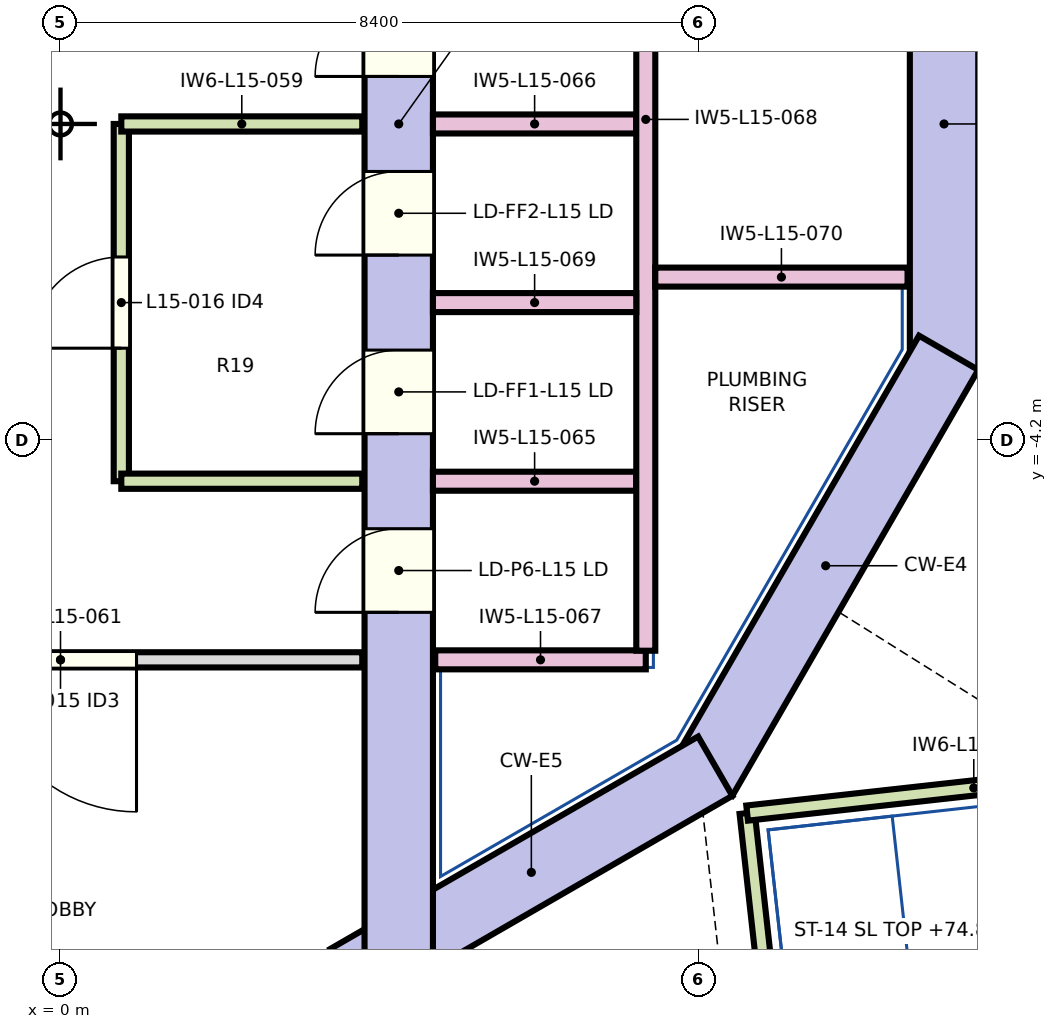
"""IFC4 building model, lengths in metres.
Left out: names, types, materials, properties, quantities, classifications, styles, units other than length and angle.
Written with IfcOpenShell. Run it as: python <this file> out.ifc"""

import sys

from ifc_helpers import new_model, si_unit, direction, frame, frame_2d, origin, place, context, subcontext, project, spatial, rectangle, extrude, element, fill, save


model = new_model("IFC4")
c1 = context("Model", 3, precision=1e-05, world=origin(), true_north=direction((0.0, 1.0)))
c2 = subcontext(c1, "Body", "Model", "MODEL_VIEW")
j1 = project(units=[si_unit("LENGTHUNIT", "METRE"), si_unit("PLANEANGLEUNIT", "RADIAN")], contexts=[c1])
p1 = place(None, origin())
s1 = spatial("IfcSite", under=j1, at=p1, CompositionType="ELEMENT")
p2 = place(p1, origin())
s2 = spatial("IfcBuilding", under=s1, at=p2, CompositionType="ELEMENT")
p3 = place(p2, frame((0.0, 0.0, 72.9)))
s3 = spatial("IfcBuildingStorey", under=s2, at=p3, CompositionType="ELEMENT", Elevation=72.9)
p4 = place(p3, frame((11.624, 3.235, 0.0), z_axis=(0.0, 0.0, 1.0), x_axis=(0.0, -1.0, 0.0)))
e1 = element("IfcWall", 1, at=p4, inside=s3, PredefinedType="SHEAR", context=c2, shape_type="SweptSolid", body=[
    extrude(rectangle(XDim=6.471, YDim=0.9, at=frame_2d((3.235, 0.0))), origin(), (0.0, 0.0, 1.0), 3.8),
])
p5 = place(p3, frame((11.684, -3.01, 0.0), z_axis=(0.0, 0.0, 1.0), x_axis=(-0.499990282633, -0.866031014036, 0.0)))
e2 = element("IfcWall", 2, at=p5, inside=s3, PredefinedType="SHEAR", context=c2, shape_type="SweptSolid", body=[
    extrude(rectangle(XDim=6.47, YDim=0.9, at=frame_2d((3.235, 0.0))), origin(), (0.0, 0.0, 1.0), 3.8),
])
p6 = place(p3, frame((8.614, -8.449, 0.0), z_axis=(0.0, 0.0, 1.0), x_axis=(-0.866026961591, -0.49999730179, 0.0)))
e3 = element("IfcWall", 3, at=p6, inside=s3, PredefinedType="SHEAR", context=c2, shape_type="SweptSolid", body=[
    extrude(rectangle(XDim=5.587, YDim=0.9, at=frame_2d((2.794, 0.0))), origin(), (0.0, 0.0, 1.0), 3.8),
])
p7 = place(p3, frame((4.45, -11.633, 0.0), z_axis=(0.0, 0.0, 1.0), x_axis=(0.0, 1.0, 0.0)))
e4 = element("IfcWall", 4, at=p7, inside=s3, PredefinedType="SHEAR", context=c2, shape_type="SweptSolid", body=[
    extrude(rectangle(XDim=23.265, YDim=0.9, at=frame_2d((11.633, 0.0))), origin(), (0.0, 0.0, 1.0), 3.8),
])
p8 = place(p7, frame((7.558, 0.0, 0.0)))
e5 = element("IfcOpeningElement", 5, at=p8, cuts=e4, PredefinedType="OPENING", context=c2, shape_type="SweptSolid", body=[
    extrude(rectangle(XDim=1.1, YDim=2.1, at=frame_2d((0.55, 1.05))), frame((0.0, 0.46, 0.0), z_axis=(0.0, -1.0, 0.0), x_axis=(1.0, 0.0, 0.0)), (0.0, 0.0, 1.0), 0.92),
])
p9 = place(p7, frame((9.907, 0.0, 0.0)))
e6 = element("IfcOpeningElement", 6, at=p9, cuts=e4, PredefinedType="OPENING", context=c2, shape_type="SweptSolid", body=[
    extrude(rectangle(XDim=1.1, YDim=2.1, at=frame_2d((0.55, 1.05))), frame((0.0, 0.46, 0.0), z_axis=(0.0, -1.0, 0.0), x_axis=(1.0, 0.0, 0.0)), (0.0, 0.0, 1.0), 0.92),
])
p10 = place(p7, frame((12.258, 0.0, 0.0)))
e7 = element("IfcOpeningElement", 7, at=p10, cuts=e4, PredefinedType="OPENING", context=c2, shape_type="SweptSolid", body=[
    extrude(rectangle(XDim=1.1, YDim=2.1, at=frame_2d((0.55, 1.05))), frame((0.0, 0.46, 0.0), z_axis=(0.0, -1.0, 0.0), x_axis=(1.0, 0.0, 0.0)), (0.0, 0.0, 1.0), 0.92),
])
p11 = place(p7, frame((14.607, 0.0, 0.0)))
e8 = element("IfcOpeningElement", 8, at=p11, cuts=e4, PredefinedType="OPENING", context=c2, shape_type="SweptSolid", body=[
    extrude(rectangle(XDim=1.1, YDim=2.1, at=frame_2d((0.55, 1.05))), frame((0.0, 0.46, 0.0), z_axis=(0.0, -1.0, 0.0), x_axis=(1.0, 0.0, 0.0)), (0.0, 0.0, 1.0), 0.92),
])
p12 = place(p7, frame((5.208, 0.0, 0.0)))
e9 = element("IfcOpeningElement", 9, at=p12, cuts=e4, PredefinedType="OPENING", context=c2, shape_type="SweptSolid", body=[
    extrude(rectangle(XDim=1.1, YDim=2.1, at=frame_2d((0.55, 1.05))), frame((0.0, 0.46, 0.0), z_axis=(0.0, -1.0, 0.0), x_axis=(1.0, 0.0, 0.0)), (0.0, 0.0, 1.0), 0.92),
])
p13 = place(p7, frame((17.008, 0.0, 0.0)))
e10 = element("IfcOpeningElement", 10, at=p13, cuts=e4, PredefinedType="OPENING", context=c2, shape_type="SweptSolid", body=[
    extrude(rectangle(XDim=1.0, YDim=2.1, at=frame_2d((0.5, 1.05))), frame((0.0, 0.46, 0.0), z_axis=(0.0, -1.0, 0.0), x_axis=(1.0, 0.0, 0.0)), (0.0, 0.0, 1.0), 0.92),
])
p14 = place(p3, frame((0.8, -4.7, 0.0), z_axis=(0.0, 0.0, 1.0), x_axis=(0.0, 1.0, 0.0)))
e11 = element("IfcWall", 11, at=p14, inside=s3, PredefinedType="SOLIDWALL", context=c2, shape_type="SweptSolid", body=[
    extrude(rectangle(XDim=4.7, YDim=0.2, at=frame_2d((2.35, 0.0))), origin(), (0.0, 0.0, 1.0), 3.55),
])
p15 = place(p14, frame((1.75, 0.0, 0.0)))
e12 = element("IfcOpeningElement", 12, at=p15, cuts=e11, PredefinedType="OPENING", context=c2, shape_type="SweptSolid", body=[
    extrude(rectangle(XDim=1.2, YDim=2.1, at=frame_2d((0.6, 1.05))), frame((0.0, 0.11, 0.0), z_axis=(0.0, -1.0, 0.0), x_axis=(1.0, 0.0, 0.0)), (0.0, 0.0, 1.0), 0.22),
])
p16 = place(p3, frame((0.8, 0.0, 0.0), z_axis=(0.0, 0.0, 1.0), x_axis=(1.0, 0.0, 0.0)))
e13 = element("IfcWall", 13, at=p16, inside=s3, PredefinedType="SOLIDWALL", context=c2, shape_type="SweptSolid", body=[
    extrude(rectangle(XDim=3.17, YDim=0.2, at=frame_2d((1.585, 0.0))), origin(), (0.0, 0.0, 1.0), 3.55),
])
p17 = place(p3, frame((3.97, -7.05, 0.0), z_axis=(0.0, 0.0, 1.0), x_axis=(-1.0, 0.0, 0.0)))
e14 = element("IfcWall", 14, at=p17, inside=s3, PredefinedType="PARTITIONING", context=c2, shape_type="SweptSolid", body=[
    extrude(rectangle(XDim=7.94, YDim=0.2, at=frame_2d((3.97, 0.0))), origin(), (0.0, 0.0, 1.0), 3.55),
])
p18 = place(p17, frame((2.97, 0.0, 0.0)))
e15 = element("IfcOpeningElement", 15, at=p18, cuts=e14, PredefinedType="OPENING", context=c2, shape_type="SweptSolid", body=[
    extrude(rectangle(XDim=2.0, YDim=2.1, at=frame_2d((1.0, 1.05))), frame((0.0, 0.11, 0.0), z_axis=(0.0, -1.0, 0.0), x_axis=(1.0, 0.0, 0.0)), (0.0, 0.0, 1.0), 0.22),
])
p19 = place(p3, frame((3.97, -4.7, 0.0), z_axis=(0.0, 0.0, 1.0), x_axis=(-1.0, 0.0, 0.0)))
e16 = element("IfcWall", 16, at=p19, inside=s3, PredefinedType="SOLIDWALL", context=c2, shape_type="SweptSolid", body=[
    extrude(rectangle(XDim=3.17, YDim=0.2, at=frame_2d((1.585, 0.0))), origin(), (0.0, 0.0, 1.0), 3.55),
])
for number, where, z_axis, x_axis in (
    (17, (4.9, -4.7, 0.0), (0.0, 0.0, 1.0), (1.0, 0.0, 0.0)),
    (18, (4.9, 0.0, 0.0), (0.0, 0.0, 1.0), (1.0, 0.0, 0.0)),
):
    element("IfcWall", number, at=place(p3, frame(where, z_axis=z_axis, x_axis=x_axis)), inside=s3, PredefinedType="SOLIDWALL", context=c2, shape_type="SweptSolid", body=[
        extrude(rectangle(XDim=2.675, YDim=0.25, at=frame_2d((1.337, 0.0))), origin(), (0.0, 0.0, 1.0), 3.55),
    ])
p20 = place(p3, frame((4.93, -7.05, 0.0), z_axis=(0.0, 0.0, 1.0), x_axis=(1.0, 0.0, 0.0)))
e19 = element("IfcWall", 19, at=p20, inside=s3, PredefinedType="SOLIDWALL", context=c2, shape_type="SweptSolid", body=[
    extrude(rectangle(XDim=2.77, YDim=0.25, at=frame_2d((1.385, 0.0))), origin(), (0.0, 0.0, 1.0), 3.55),
])
p21 = place(p3, frame((7.7, -6.93, 0.0), z_axis=(0.0, 0.0, 1.0), x_axis=(0.0, 1.0, 0.0)))
e20 = element("IfcWall", 20, at=p21, inside=s3, PredefinedType="SOLIDWALL", context=c2, shape_type="SweptSolid", body=[
    extrude(rectangle(XDim=13.98, YDim=0.25, at=frame_2d((6.99, 0.0))), origin(), (0.0, 0.0, 1.0), 3.55),
])
p22 = place(p3, frame((7.575, -2.35, 0.0), z_axis=(0.0, 0.0, 1.0), x_axis=(-1.0, 0.0, 0.0)))
e21 = element("IfcWall", 21, at=p22, inside=s3, PredefinedType="SOLIDWALL", context=c2, shape_type="SweptSolid", body=[
    extrude(rectangle(XDim=2.675, YDim=0.25, at=frame_2d((1.337, 0.0))), origin(), (0.0, 0.0, 1.0), 3.55),
])
p23 = place(p3, frame((7.825, -2.015, 0.0), z_axis=(0.0, 0.0, 1.0), x_axis=(1.0, 0.0, 0.0)))
e22 = element("IfcWall", 22, at=p23, inside=s3, PredefinedType="SOLIDWALL", context=c2, shape_type="SweptSolid", body=[
    extrude(rectangle(XDim=3.319, YDim=0.25, at=frame_2d((1.66, 0.0))), origin(), (0.0, 0.0, 1.0), 3.55),
])
p24 = place(p3, frame((9.033, -9.066, 0.0), z_axis=(0.0, 0.0, 1.0), x_axis=(0.11030110325, -0.993898217436, 0.0)))
e23 = element("IfcWall", 23, at=p24, inside=s3, PredefinedType="SOLIDWALL", context=c2, shape_type="SweptSolid", body=[
    extrude(rectangle(XDim=3.493, YDim=0.2, at=frame_2d((1.746, 0.0))), origin(), (0.0, 0.0, 1.0), 3.55),
])
p25 = place(p3, frame((14.997, -8.404, 0.0), z_axis=(0.0, 0.0, 1.0), x_axis=(-0.993897125329, -0.110310943534, 0.0)))
e24 = element("IfcWall", 24, at=p25, inside=s3, PredefinedType="SOLIDWALL", context=c2, shape_type="SweptSolid", body=[
    extrude(rectangle(XDim=6.0, YDim=0.2, at=frame_2d((3.0, 0.0))), origin(), (0.0, 0.0, 1.0), 3.55),
])
p26 = place(p18, origin())
e25 = element("IfcDoor", 25, at=p26, inside=s3, OperationType="NOTDEFINED", PredefinedType="DOOR", context=c2, shape_type="SweptSolid", body=[
    extrude(rectangle(XDim=2.0, YDim=2.1, at=frame_2d((1.0, 1.05))), frame((0.0, 0.025, 0.0), z_axis=(0.0, -1.0, 0.0), x_axis=(1.0, 0.0, 0.0)), (0.0, 0.0, 1.0), 0.05),
])
fill(e15, e25)
p27 = place(p15, origin())
e26 = element("IfcDoor", 26, at=p27, inside=s3, OperationType="NOTDEFINED", PredefinedType="DOOR", context=c2, shape_type="SweptSolid", body=[
    extrude(rectangle(XDim=1.2, YDim=2.1, at=frame_2d((0.6, 1.05))), frame((0.0, 0.025, 0.0), z_axis=(0.0, -1.0, 0.0), x_axis=(1.0, 0.0, 0.0)), (0.0, 0.0, 1.0), 0.05),
])
fill(e12, e26)
p28 = place(p8, origin())
e27 = element("IfcDoor", 27, at=p28, inside=s3, OperationType="SLIDING_TO_LEFT", PredefinedType="DOOR", context=c2, shape_type="SweptSolid", body=[
    extrude(rectangle(XDim=1.1, YDim=2.1, at=frame_2d((0.55, 1.05))), frame((0.0, 0.025, 0.0), z_axis=(0.0, -1.0, 0.0), x_axis=(1.0, 0.0, 0.0)), (0.0, 0.0, 1.0), 0.05),
])
fill(e5, e27)
p29 = place(p9, origin())
e28 = element("IfcDoor", 28, at=p29, inside=s3, OperationType="SLIDING_TO_LEFT", PredefinedType="DOOR", context=c2, shape_type="SweptSolid", body=[
    extrude(rectangle(XDim=1.1, YDim=2.1, at=frame_2d((0.55, 1.05))), frame((0.0, 0.025, 0.0), z_axis=(0.0, -1.0, 0.0), x_axis=(1.0, 0.0, 0.0)), (0.0, 0.0, 1.0), 0.05),
])
fill(e6, e28)
p30 = place(p10, origin())
e29 = element("IfcDoor", 29, at=p30, inside=s3, OperationType="SLIDING_TO_LEFT", PredefinedType="DOOR", context=c2, shape_type="SweptSolid", body=[
    extrude(rectangle(XDim=1.1, YDim=2.1, at=frame_2d((0.55, 1.05))), frame((0.0, 0.025, 0.0), z_axis=(0.0, -1.0, 0.0), x_axis=(1.0, 0.0, 0.0)), (0.0, 0.0, 1.0), 0.05),
])
fill(e7, e29)
p31 = place(p12, origin())
e30 = element("IfcDoor", 30, at=p31, inside=s3, OperationType="SLIDING_TO_LEFT", PredefinedType="DOOR", context=c2, shape_type="SweptSolid", body=[
    extrude(rectangle(XDim=1.1, YDim=2.1, at=frame_2d((0.55, 1.05))), frame((0.0, 0.025, 0.0), z_axis=(0.0, -1.0, 0.0), x_axis=(1.0, 0.0, 0.0)), (0.0, 0.0, 1.0), 0.05),
])
fill(e9, e30)
save(model, sys.argv[1])
